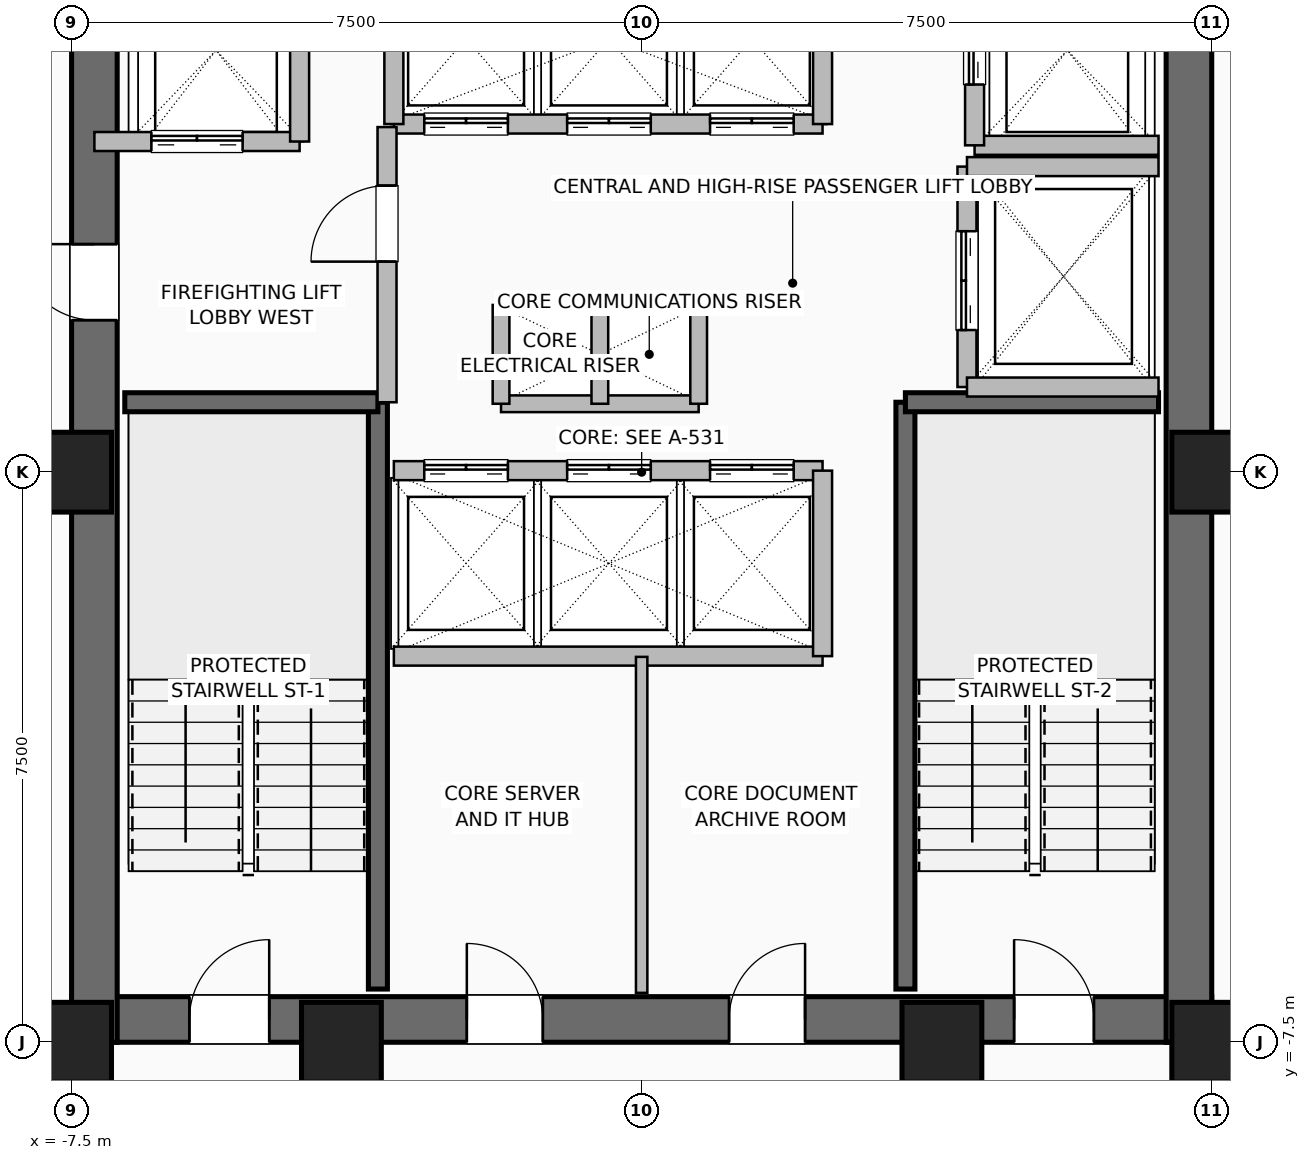
"""IFC4 building model, lengths in metres.
Left out: names, types, materials, properties, quantities, classifications, styles, units other than length and angle.
Written with IfcOpenShell. Run it as: python <this file> out.ifc"""

import sys

from ifc_helpers import new_model, si_unit, direction, frame, frame_2d, origin, origin_2d, place, context, subcontext, project, spatial, rectangle, hollow_rectangle, extrude, element, fill, save


model = new_model("IFC4")
c1 = context("Model", 3, precision=1e-05, world=origin(), true_north=direction((0.0, 1.0)))
c2 = subcontext(c1, "Body", "Model", "MODEL_VIEW")
j1 = project(units=[si_unit("LENGTHUNIT", "METRE"), si_unit("PLANEANGLEUNIT", "RADIAN")], contexts=[c1])
p1 = place(None, origin())
s1 = spatial("IfcSite", under=j1, at=p1, CompositionType="ELEMENT")
p2 = place(p1, origin())
s2 = spatial("IfcBuilding", under=s1, at=p2, CompositionType="ELEMENT")
p3 = place(p2, frame((0.0, 0.0, 119.2)))
s3 = spatial("IfcBuildingStorey", under=s2, at=p3, CompositionType="ELEMENT", Elevation=119.2)
for number, where, z_axis, x_axis in (
    (1, (-7.5, -7.5, 0.0), (0.0, 0.0, 1.0), (1.0, 0.0, 0.0)),
    (2, (-3.95, -7.5, 0.0), (0.0, 0.0, 1.0), (1.0, 0.0, 0.0)),
    (3, (3.95, -7.5, 0.0), (0.0, 0.0, 1.0), (1.0, 0.0, 0.0)),
    (4, (7.5, -7.5, 0.0), (0.0, 0.0, 1.0), (1.0, 0.0, 0.0)),
    (5, (7.5, 0.0, 0.0), (0.0, 0.0, 1.0), (1.0, 0.0, 0.0)),
    (6, (-7.5, 0.0, 0.0), (0.0, 0.0, 1.0), (1.0, 0.0, 0.0)),
):
    element("IfcColumn", number, at=place(p3, frame(where, z_axis=z_axis, x_axis=x_axis)), inside=s3, PredefinedType="COLUMN", context=c2, shape_type="SweptSolid", body=[
        extrude(hollow_rectangle(XDim=1.05, YDim=1.05, WallThickness=0.05, at=origin_2d()), origin(), (0.0, 0.0, 1.0), 3.6),
    ])
p4 = place(p3, frame((-7.5, -7.2, 0.0), z_axis=(0.0, 0.0, 1.0), x_axis=(1.0, 0.0, 0.0)))
e7 = element("IfcWall", 7, at=p4, inside=s3, PredefinedType="SHEAR", context=c2, shape_type="SweptSolid", body=[
    extrude(rectangle(XDim=15.0, YDim=0.6, at=frame_2d((7.5, 0.0))), origin(), (0.0, 0.0, 1.0), 3.36),
])
p5 = place(p4, frame((1.55, 0.0, 0.0)))
e8 = element("IfcOpeningElement", 8, at=p5, cuts=e7, PredefinedType="OPENING", context=c2, shape_type="SweptSolid", body=[
    extrude(rectangle(XDim=1.05, YDim=2.08, at=frame_2d((0.525, 1.04))), frame((0.0, 0.31, 0.0), z_axis=(0.0, -1.0, 0.0), x_axis=(1.0, 0.0, 0.0)), (0.0, 0.0, 1.0), 0.62),
])
p6 = place(p4, frame((12.4, 0.0, 0.0)))
e9 = element("IfcOpeningElement", 9, at=p6, cuts=e7, PredefinedType="OPENING", context=c2, shape_type="SweptSolid", body=[
    extrude(rectangle(XDim=1.05, YDim=2.08, at=frame_2d((0.525, 1.04))), frame((0.0, 0.31, 0.0), z_axis=(0.0, -1.0, 0.0), x_axis=(1.0, 0.0, 0.0)), (0.0, 0.0, 1.0), 0.62),
])
p7 = place(p4, frame((5.2, 0.0, 0.0)))
e10 = element("IfcOpeningElement", 10, at=p7, cuts=e7, PredefinedType="OPENING", context=c2, shape_type="SweptSolid", body=[
    extrude(rectangle(XDim=1.0, YDim=2.08, at=frame_2d((0.5, 1.04))), frame((0.0, 0.31, 0.0), z_axis=(0.0, -1.0, 0.0), x_axis=(1.0, 0.0, 0.0)), (0.0, 0.0, 1.0), 0.62),
])
p8 = place(p4, frame((8.65, 0.0, 0.0)))
e11 = element("IfcOpeningElement", 11, at=p8, cuts=e7, PredefinedType="OPENING", context=c2, shape_type="SweptSolid", body=[
    extrude(rectangle(XDim=1.0, YDim=2.08, at=frame_2d((0.5, 1.04))), frame((0.0, 0.31, 0.0), z_axis=(0.0, -1.0, 0.0), x_axis=(1.0, 0.0, 0.0)), (0.0, 0.0, 1.0), 0.62),
])
p9 = place(p3, frame((-7.2, -7.5, 0.0), z_axis=(0.0, 0.0, 1.0), x_axis=(0.0, 1.0, 0.0)))
e12 = element("IfcWall", 12, at=p9, inside=s3, PredefinedType="SHEAR", context=c2, shape_type="SweptSolid", body=[
    extrude(rectangle(XDim=15.0, YDim=0.6, at=frame_2d((7.5, 0.0))), origin(), (0.0, 0.0, 1.0), 3.36),
])
p10 = place(p9, frame((9.5, 0.0, 0.0)))
e13 = element("IfcOpeningElement", 13, at=p10, cuts=e12, PredefinedType="OPENING", context=c2, shape_type="SweptSolid", body=[
    extrude(rectangle(XDim=1.0, YDim=2.08, at=frame_2d((0.5, 1.04))), frame((0.0, 0.31, 0.0), z_axis=(0.0, -1.0, 0.0), x_axis=(1.0, 0.0, 0.0)), (0.0, 0.0, 1.0), 0.62),
])
p11 = place(p3, frame((7.2, -7.5, 0.0), z_axis=(0.0, 0.0, 1.0), x_axis=(0.0, 1.0, 0.0)))
e14 = element("IfcWall", 14, at=p11, inside=s3, PredefinedType="SHEAR", context=c2, shape_type="SweptSolid", body=[
    extrude(rectangle(XDim=15.0, YDim=0.6, at=frame_2d((7.5, 0.0))), origin(), (0.0, 0.0, 1.0), 3.36),
])
p12 = place(p3, frame((-3.47, -6.8, 0.0), z_axis=(0.0, 0.0, 1.0), x_axis=(0.0, 1.0, 0.0)))
e15 = element("IfcWall", 15, at=p12, inside=s3, PredefinedType="SHEAR", context=c2, shape_type="SweptSolid", body=[
    extrude(rectangle(XDim=7.72, YDim=0.25, at=frame_2d((3.86, 0.0))), origin(), (0.0, 0.0, 1.0), 3.36),
])
p13 = place(p3, frame((-6.8, 0.92, 0.0), z_axis=(0.0, 0.0, 1.0), x_axis=(1.0, 0.0, 0.0)))
e16 = element("IfcWall", 16, at=p13, inside=s3, PredefinedType="SHEAR", context=c2, shape_type="SweptSolid", body=[
    extrude(rectangle(XDim=3.33, YDim=0.25, at=frame_2d((1.665, 0.0))), origin(), (0.0, 0.0, 1.0), 3.36),
])
p14 = place(p3, frame((3.47, -6.8, 0.0), z_axis=(0.0, 0.0, 1.0), x_axis=(0.0, 1.0, 0.0)))
e17 = element("IfcWall", 17, at=p14, inside=s3, PredefinedType="SHEAR", context=c2, shape_type="SweptSolid", body=[
    extrude(rectangle(XDim=7.72, YDim=0.25, at=frame_2d((3.86, 0.0))), origin(), (0.0, 0.0, 1.0), 3.36),
])
p15 = place(p3, frame((3.47, 0.92, 0.0), z_axis=(0.0, 0.0, 1.0), x_axis=(1.0, 0.0, 0.0)))
e18 = element("IfcWall", 18, at=p15, inside=s3, PredefinedType="SHEAR", context=c2, shape_type="SweptSolid", body=[
    extrude(rectangle(XDim=3.33, YDim=0.25, at=frame_2d((1.665, 0.0))), origin(), (0.0, 0.0, 1.0), 3.36),
])
for number, where, z_axis, x_axis in (
    (19, (-1.85, 2.2, 0.0), (0.0, 0.0, 1.0), (1.0, 0.0, 0.0)),
    (20, (-1.85, 0.9, 0.0), (0.0, 0.0, 1.0), (1.0, 0.0, 0.0)),
):
    element("IfcWall", number, at=place(p3, frame(where, z_axis=z_axis, x_axis=x_axis)), inside=s3, PredefinedType="PARTITIONING", context=c2, shape_type="SweptSolid", body=[
        extrude(rectangle(XDim=2.6, YDim=0.22, at=frame_2d((1.3, 0.0))), origin(), (0.0, 0.0, 1.0), 3.36),
    ])
for number, where, z_axis, x_axis in (
    (21, (-0.55, 0.9, 0.0), (0.0, 0.0, 1.0), (0.0, 1.0, 0.0)),
    (22, (0.75, 0.9, 0.0), (0.0, 0.0, 1.0), (0.0, 1.0, 0.0)),
    (23, (-1.85, 0.9, 0.0), (0.0, 0.0, 1.0), (0.0, 1.0, 0.0)),
):
    element("IfcWall", number, at=place(p3, frame(where, z_axis=z_axis, x_axis=x_axis)), inside=s3, PredefinedType="PARTITIONING", context=c2, shape_type="SweptSolid", body=[
        extrude(rectangle(XDim=1.3, YDim=0.22, at=frame_2d((0.65, 0.0))), origin(), (0.0, 0.0, 1.0), 3.36),
    ])
p16 = place(p3, frame((-3.26, 0.02, 0.0), z_axis=(0.0, 0.0, 1.0), x_axis=(1.0, 0.0, 0.0)))
e24 = element("IfcWall", 24, at=p16, inside=s3, PredefinedType="SHEAR", context=c2, shape_type="SweptSolid", body=[
    extrude(rectangle(XDim=5.64, YDim=0.25, at=frame_2d((2.82, 0.0))), origin(), (0.0, 0.0, 1.0), 3.36),
])
p17 = place(p16, frame((0.4, 0.0, 0.0)))
e25 = element("IfcOpeningElement", 25, at=p17, cuts=e24, PredefinedType="OPENING", context=c2, shape_type="SweptSolid", body=[
    extrude(rectangle(XDim=1.1, YDim=2.2, at=frame_2d((0.55, 1.1))), frame((0.0, 0.135, 0.0), z_axis=(0.0, -1.0, 0.0), x_axis=(1.0, 0.0, 0.0)), (0.0, 0.0, 1.0), 0.27),
])
p18 = place(p16, frame((2.28, 0.0, 0.0)))
e26 = element("IfcOpeningElement", 26, at=p18, cuts=e24, PredefinedType="OPENING", context=c2, shape_type="SweptSolid", body=[
    extrude(rectangle(XDim=1.1, YDim=2.2, at=frame_2d((0.55, 1.1))), frame((0.0, 0.135, 0.0), z_axis=(0.0, -1.0, 0.0), x_axis=(1.0, 0.0, 0.0)), (0.0, 0.0, 1.0), 0.27),
])
p19 = place(p16, frame((4.16, 0.0, 0.0)))
e27 = element("IfcOpeningElement", 27, at=p19, cuts=e24, PredefinedType="OPENING", context=c2, shape_type="SweptSolid", body=[
    extrude(rectangle(XDim=1.1, YDim=2.2, at=frame_2d((0.55, 1.1))), frame((0.0, 0.135, 0.0), z_axis=(0.0, -1.0, 0.0), x_axis=(1.0, 0.0, 0.0)), (0.0, 0.0, 1.0), 0.27),
])
p20 = place(p3, frame((-3.26, -2.42, 0.0), z_axis=(0.0, 0.0, 1.0), x_axis=(1.0, 0.0, 0.0)))
e28 = element("IfcWall", 28, at=p20, inside=s3, PredefinedType="SHEAR", context=c2, shape_type="SweptSolid", body=[
    extrude(rectangle(XDim=5.64, YDim=0.25, at=frame_2d((2.82, 0.0))), origin(), (0.0, 0.0, 1.0), 3.36),
])
p21 = place(p3, frame((2.38, -2.42, 0.0), z_axis=(0.0, 0.0, 1.0), x_axis=(0.0, 1.0, 0.0)))
e29 = element("IfcWall", 29, at=p21, inside=s3, PredefinedType="SHEAR", context=c2, shape_type="SweptSolid", body=[
    extrude(rectangle(XDim=2.44, YDim=0.25, at=frame_2d((1.22, 0.0))), origin(), (0.0, 0.0, 1.0), 3.36),
])
p22 = place(p3, frame((-3.26, 4.58, 0.0), z_axis=(0.0, 0.0, 1.0), x_axis=(1.0, 0.0, 0.0)))
e30 = element("IfcWall", 30, at=p22, inside=s3, PredefinedType="SHEAR", context=c2, shape_type="SweptSolid", body=[
    extrude(rectangle(XDim=5.64, YDim=0.25, at=frame_2d((2.82, 0.0))), origin(), (0.0, 0.0, 1.0), 3.36),
])
p23 = place(p22, frame((0.4, 0.0, 0.0)))
e31 = element("IfcOpeningElement", 31, at=p23, cuts=e30, PredefinedType="OPENING", context=c2, shape_type="SweptSolid", body=[
    extrude(rectangle(XDim=1.1, YDim=2.2, at=frame_2d((0.55, 1.1))), frame((0.0, 0.135, 0.0), z_axis=(0.0, -1.0, 0.0), x_axis=(1.0, 0.0, 0.0)), (0.0, 0.0, 1.0), 0.27),
])
p24 = place(p22, frame((2.28, 0.0, 0.0)))
e32 = element("IfcOpeningElement", 32, at=p24, cuts=e30, PredefinedType="OPENING", context=c2, shape_type="SweptSolid", body=[
    extrude(rectangle(XDim=1.1, YDim=2.2, at=frame_2d((0.55, 1.1))), frame((0.0, 0.135, 0.0), z_axis=(0.0, -1.0, 0.0), x_axis=(1.0, 0.0, 0.0)), (0.0, 0.0, 1.0), 0.27),
])
p25 = place(p22, frame((4.16, 0.0, 0.0)))
e33 = element("IfcOpeningElement", 33, at=p25, cuts=e30, PredefinedType="OPENING", context=c2, shape_type="SweptSolid", body=[
    extrude(rectangle(XDim=1.1, YDim=2.2, at=frame_2d((0.55, 1.1))), frame((0.0, 0.135, 0.0), z_axis=(0.0, -1.0, 0.0), x_axis=(1.0, 0.0, 0.0)), (0.0, 0.0, 1.0), 0.27),
])
for number, where, z_axis, x_axis in (
    (34, (-3.26, 4.58, 0.0), (0.0, 0.0, 1.0), (0.0, 1.0, 0.0)),
    (35, (2.38, 4.58, 0.0), (0.0, 0.0, 1.0), (0.0, 1.0, 0.0)),
):
    element("IfcWall", number, at=place(p3, frame(where, z_axis=z_axis, x_axis=x_axis)), inside=s3, PredefinedType="SHEAR", context=c2, shape_type="SweptSolid", body=[
        extrude(rectangle(XDim=2.22, YDim=0.25, at=frame_2d((1.11, 0.0))), origin(), (0.0, 0.0, 1.0), 3.36),
    ])
p26 = place(p3, frame((-7.2, 4.35, 0.0), z_axis=(0.0, 0.0, 1.0), x_axis=(1.0, 0.0, 0.0)))
e36 = element("IfcWall", 36, at=p26, inside=s3, PredefinedType="SHEAR", context=c2, shape_type="SweptSolid", body=[
    extrude(rectangle(XDim=2.7, YDim=0.25, at=frame_2d((1.35, 0.0))), origin(), (0.0, 0.0, 1.0), 3.36),
])
p27 = place(p26, frame((0.75, 0.0, 0.0)))
e37 = element("IfcOpeningElement", 37, at=p27, cuts=e36, PredefinedType="OPENING", context=c2, shape_type="SweptSolid", body=[
    extrude(rectangle(XDim=1.2, YDim=2.2, at=frame_2d((0.6, 1.1))), frame((0.0, 0.135, 0.0), z_axis=(0.0, -1.0, 0.0), x_axis=(1.0, 0.0, 0.0)), (0.0, 0.0, 1.0), 0.27),
])
p28 = place(p3, frame((-4.5, 4.35, 0.0), z_axis=(0.0, 0.0, 1.0), x_axis=(0.0, 1.0, 0.0)))
e38 = element("IfcWall", 38, at=p28, inside=s3, PredefinedType="SHEAR", context=c2, shape_type="SweptSolid", body=[
    extrude(rectangle(XDim=2.85, YDim=0.25, at=frame_2d((1.425, 0.0))), origin(), (0.0, 0.0, 1.0), 3.36),
])
p29 = place(p3, frame((4.38, 4.3, 0.0), z_axis=(0.0, 0.0, 1.0), x_axis=(1.0, 0.0, 0.0)))
e39 = element("IfcWall", 39, at=p29, inside=s3, PredefinedType="SHEAR", context=c2, shape_type="SweptSolid", body=[
    extrude(rectangle(XDim=2.42, YDim=0.25, at=frame_2d((1.21, 0.0))), origin(), (0.0, 0.0, 1.0), 3.36),
])
p30 = place(p3, frame((4.38, 4.3, 0.0), z_axis=(0.0, 0.0, 1.0), x_axis=(0.0, 1.0, 0.0)))
e40 = element("IfcWall", 40, at=p30, inside=s3, PredefinedType="SHEAR", context=c2, shape_type="SweptSolid", body=[
    extrude(rectangle(XDim=2.5, YDim=0.25, at=frame_2d((1.25, 0.0))), origin(), (0.0, 0.0, 1.0), 3.36),
])
p31 = place(p30, frame((0.8, 0.0, 0.0)))
e41 = element("IfcOpeningElement", 41, at=p31, cuts=e40, PredefinedType="OPENING", context=c2, shape_type="SweptSolid", body=[
    extrude(rectangle(XDim=1.2, YDim=2.2, at=frame_2d((0.6, 1.1))), frame((0.0, 0.135, 0.0), z_axis=(0.0, -1.0, 0.0), x_axis=(1.0, 0.0, 0.0)), (0.0, 0.0, 1.0), 0.27),
])
p32 = place(p3, frame((4.28, 1.12, 0.0), z_axis=(0.0, 0.0, 1.0), x_axis=(0.0, 1.0, 0.0)))
e42 = element("IfcWall", 42, at=p32, inside=s3, PredefinedType="SHEAR", context=c2, shape_type="SweptSolid", body=[
    extrude(rectangle(XDim=2.9, YDim=0.25, at=frame_2d((1.45, 0.0))), origin(), (0.0, 0.0, 1.0), 3.36),
])
p33 = place(p32, frame((0.75, 0.0, 0.0)))
e43 = element("IfcOpeningElement", 43, at=p33, cuts=e42, PredefinedType="OPENING", context=c2, shape_type="SweptSolid", body=[
    extrude(rectangle(XDim=1.3, YDim=2.3, at=frame_2d((0.65, 1.15))), frame((0.0, 0.135, 0.0), z_axis=(0.0, -1.0, 0.0), x_axis=(1.0, 0.0, 0.0)), (0.0, 0.0, 1.0), 0.27),
])
for number, where, z_axis, x_axis in (
    (44, (4.28, 1.12, 0.0), (0.0, 0.0, 1.0), (1.0, 0.0, 0.0)),
    (45, (4.28, 4.02, 0.0), (0.0, 0.0, 1.0), (1.0, 0.0, 0.0)),
):
    element("IfcWall", number, at=place(p3, frame(where, z_axis=z_axis, x_axis=x_axis)), inside=s3, PredefinedType="SHEAR", context=c2, shape_type="SweptSolid", body=[
        extrude(rectangle(XDim=2.52, YDim=0.25, at=frame_2d((1.26, 0.0))), origin(), (0.0, 0.0, 1.0), 3.36),
    ])
p34 = place(p3, frame((-3.35, 0.92, 0.0), z_axis=(0.0, 0.0, 1.0), x_axis=(0.0, 1.0, 0.0)))
e46 = element("IfcWall", 46, at=p34, inside=s3, PredefinedType="SHEAR", context=c2, shape_type="SweptSolid", body=[
    extrude(rectangle(XDim=3.62, YDim=0.25, at=frame_2d((1.81, 0.0))), origin(), (0.0, 0.0, 1.0), 3.36),
])
p35 = place(p34, frame((1.85, 0.0, 0.0)))
e47 = element("IfcOpeningElement", 47, at=p35, cuts=e46, PredefinedType="OPENING", context=c2, shape_type="SweptSolid", body=[
    extrude(rectangle(XDim=1.0, YDim=2.08, at=frame_2d((0.5, 1.04))), frame((0.0, 0.135, 0.0), z_axis=(0.0, -1.0, 0.0), x_axis=(1.0, 0.0, 0.0)), (0.0, 0.0, 1.0), 0.27),
])
p36 = place(p3, frame((0.0, -6.85, 0.0), z_axis=(0.0, 0.0, 1.0), x_axis=(0.0, 1.0, 0.0)))
e48 = element("IfcWall", 48, at=p36, inside=s3, PredefinedType="PARTITIONING", context=c2, shape_type="SweptSolid", body=[
    extrude(rectangle(XDim=4.42, YDim=0.15, at=frame_2d((2.21, 0.0))), origin(), (0.0, 0.0, 1.0), 3.36),
])
p37 = place(p3, frame((7.45, -7.48, 0.0), z_axis=(0.0, 0.0, 1.0), x_axis=(1.0, 0.0, 0.0)))
e49 = element("IfcWall", 49, at=p37, inside=s3, PredefinedType="PARTITIONING", context=c2, shape_type="SweptSolid", body=[
    extrude(rectangle(XDim=0.95, YDim=0.15, at=frame_2d((0.475, 0.0))), origin(), (0.0, 0.0, 1.0), 3.36),
])
p38 = place(p5, origin())
e50 = element("IfcDoor", 50, at=p38, inside=s3, OperationType="SINGLE_SWING_RIGHT", PredefinedType="DOOR", context=c2, shape_type="SweptSolid", body=[
    extrude(rectangle(XDim=1.05, YDim=2.08, at=frame_2d((0.525, 1.04))), frame((0.0, 0.025, 0.0), z_axis=(0.0, -1.0, 0.0), x_axis=(1.0, 0.0, 0.0)), (0.0, 0.0, 1.0), 0.05),
])
fill(e8, e50)
p39 = place(p6, origin())
e51 = element("IfcDoor", 51, at=p39, inside=s3, OperationType="SINGLE_SWING_LEFT", PredefinedType="DOOR", context=c2, shape_type="SweptSolid", body=[
    extrude(rectangle(XDim=1.05, YDim=2.08, at=frame_2d((0.525, 1.04))), frame((0.0, 0.025, 0.0), z_axis=(0.0, -1.0, 0.0), x_axis=(1.0, 0.0, 0.0)), (0.0, 0.0, 1.0), 0.05),
])
fill(e9, e51)
p40 = place(p10, origin())
e52 = element("IfcDoor", 52, at=p40, inside=s3, OperationType="SINGLE_SWING_RIGHT", PredefinedType="DOOR", context=c2, shape_type="SweptSolid", body=[
    extrude(rectangle(XDim=1.0, YDim=2.08, at=frame_2d((0.5, 1.04))), frame((0.0, 0.025, 0.0), z_axis=(0.0, -1.0, 0.0), x_axis=(1.0, 0.0, 0.0)), (0.0, 0.0, 1.0), 0.05),
])
fill(e13, e52)
p41 = place(p7, origin())
e53 = element("IfcDoor", 53, at=p41, inside=s3, OperationType="SINGLE_SWING_LEFT", PredefinedType="DOOR", context=c2, shape_type="SweptSolid", body=[
    extrude(rectangle(XDim=1.0, YDim=2.08, at=frame_2d((0.5, 1.04))), frame((0.0, 0.025, 0.0), z_axis=(0.0, -1.0, 0.0), x_axis=(1.0, 0.0, 0.0)), (0.0, 0.0, 1.0), 0.05),
])
fill(e10, e53)
p42 = place(p8, origin())
e54 = element("IfcDoor", 54, at=p42, inside=s3, OperationType="SINGLE_SWING_RIGHT", PredefinedType="DOOR", context=c2, shape_type="SweptSolid", body=[
    extrude(rectangle(XDim=1.0, YDim=2.08, at=frame_2d((0.5, 1.04))), frame((0.0, 0.025, 0.0), z_axis=(0.0, -1.0, 0.0), x_axis=(1.0, 0.0, 0.0)), (0.0, 0.0, 1.0), 0.05),
])
fill(e11, e54)
p43 = place(p17, origin())
e55 = element("IfcDoor", 55, at=p43, inside=s3, OperationType="DOUBLE_DOOR_SLIDING", PredefinedType="DOOR", context=c2, shape_type="SweptSolid", body=[
    extrude(rectangle(XDim=1.1, YDim=2.2, at=frame_2d((0.55, 1.1))), frame((0.0, 0.025, 0.0), z_axis=(0.0, -1.0, 0.0), x_axis=(1.0, 0.0, 0.0)), (0.0, 0.0, 1.0), 0.05),
])
fill(e25, e55)
p44 = place(p18, origin())
e56 = element("IfcDoor", 56, at=p44, inside=s3, OperationType="DOUBLE_DOOR_SLIDING", PredefinedType="DOOR", context=c2, shape_type="SweptSolid", body=[
    extrude(rectangle(XDim=1.1, YDim=2.2, at=frame_2d((0.55, 1.1))), frame((0.0, 0.025, 0.0), z_axis=(0.0, -1.0, 0.0), x_axis=(1.0, 0.0, 0.0)), (0.0, 0.0, 1.0), 0.05),
])
fill(e26, e56)
p45 = place(p19, origin())
e57 = element("IfcDoor", 57, at=p45, inside=s3, OperationType="DOUBLE_DOOR_SLIDING", PredefinedType="DOOR", context=c2, shape_type="SweptSolid", body=[
    extrude(rectangle(XDim=1.1, YDim=2.2, at=frame_2d((0.55, 1.1))), frame((0.0, 0.025, 0.0), z_axis=(0.0, -1.0, 0.0), x_axis=(1.0, 0.0, 0.0)), (0.0, 0.0, 1.0), 0.05),
])
fill(e27, e57)
p46 = place(p23, origin())
e58 = element("IfcDoor", 58, at=p46, inside=s3, OperationType="DOUBLE_DOOR_SLIDING", PredefinedType="DOOR", context=c2, shape_type="SweptSolid", body=[
    extrude(rectangle(XDim=1.1, YDim=2.2, at=frame_2d((0.55, 1.1))), frame((0.0, 0.025, 0.0), z_axis=(0.0, -1.0, 0.0), x_axis=(1.0, 0.0, 0.0)), (0.0, 0.0, 1.0), 0.05),
])
fill(e31, e58)
p47 = place(p24, origin())
e59 = element("IfcDoor", 59, at=p47, inside=s3, OperationType="DOUBLE_DOOR_SLIDING", PredefinedType="DOOR", context=c2, shape_type="SweptSolid", body=[
    extrude(rectangle(XDim=1.1, YDim=2.2, at=frame_2d((0.55, 1.1))), frame((0.0, 0.025, 0.0), z_axis=(0.0, -1.0, 0.0), x_axis=(1.0, 0.0, 0.0)), (0.0, 0.0, 1.0), 0.05),
])
fill(e32, e59)
p48 = place(p25, origin())
e60 = element("IfcDoor", 60, at=p48, inside=s3, OperationType="DOUBLE_DOOR_SLIDING", PredefinedType="DOOR", context=c2, shape_type="SweptSolid", body=[
    extrude(rectangle(XDim=1.1, YDim=2.2, at=frame_2d((0.55, 1.1))), frame((0.0, 0.025, 0.0), z_axis=(0.0, -1.0, 0.0), x_axis=(1.0, 0.0, 0.0)), (0.0, 0.0, 1.0), 0.05),
])
fill(e33, e60)
p49 = place(p27, origin())
e61 = element("IfcDoor", 61, at=p49, inside=s3, OperationType="DOUBLE_DOOR_SLIDING", PredefinedType="DOOR", context=c2, shape_type="SweptSolid", body=[
    extrude(rectangle(XDim=1.2, YDim=2.2, at=frame_2d((0.6, 1.1))), frame((0.0, 0.025, 0.0), z_axis=(0.0, -1.0, 0.0), x_axis=(1.0, 0.0, 0.0)), (0.0, 0.0, 1.0), 0.05),
])
fill(e37, e61)
p50 = place(p31, origin())
e62 = element("IfcDoor", 62, at=p50, inside=s3, OperationType="DOUBLE_DOOR_SLIDING", PredefinedType="DOOR", context=c2, shape_type="SweptSolid", body=[
    extrude(rectangle(XDim=1.2, YDim=2.2, at=frame_2d((0.6, 1.1))), frame((0.0, 0.025, 0.0), z_axis=(0.0, -1.0, 0.0), x_axis=(1.0, 0.0, 0.0)), (0.0, 0.0, 1.0), 0.05),
])
fill(e41, e62)
p51 = place(p33, origin())
e63 = element("IfcDoor", 63, at=p51, inside=s3, OperationType="DOUBLE_DOOR_SLIDING", PredefinedType="DOOR", context=c2, shape_type="SweptSolid", body=[
    extrude(rectangle(XDim=1.3, YDim=2.3, at=frame_2d((0.65, 1.15))), frame((0.0, 0.025, 0.0), z_axis=(0.0, -1.0, 0.0), x_axis=(1.0, 0.0, 0.0)), (0.0, 0.0, 1.0), 0.05),
])
fill(e43, e63)
p52 = place(p35, origin())
e64 = element("IfcDoor", 64, at=p52, inside=s3, OperationType="SINGLE_SWING_LEFT", PredefinedType="DOOR", context=c2, shape_type="SweptSolid", body=[
    extrude(rectangle(XDim=1.0, YDim=2.08, at=frame_2d((0.5, 1.04))), frame((0.0, 0.025, 0.0), z_axis=(0.0, -1.0, 0.0), x_axis=(1.0, 0.0, 0.0)), (0.0, 0.0, 1.0), 0.05),
])
fill(e47, e64)
save(model, sys.argv[1])
